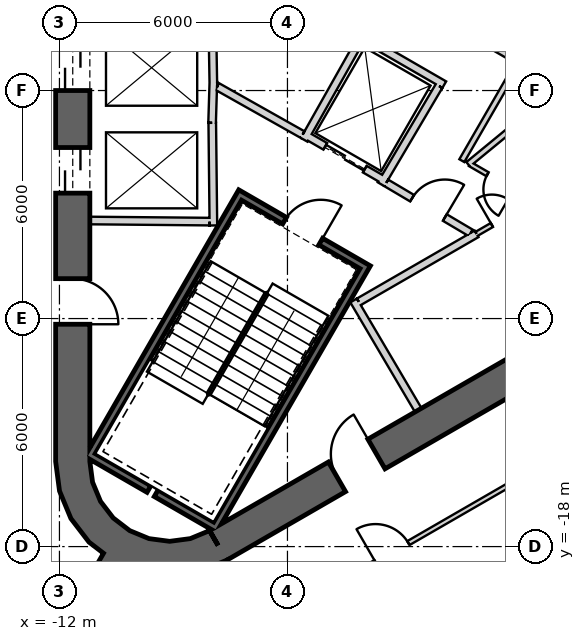
"""IFC4 building model, lengths in metres.
Left out: names, types, materials, properties, quantities, classifications, styles, units other than length and angle.
Written with IfcOpenShell. Run it as: python <this file> out.ifc"""

import sys

from ifc_helpers import new_model, si_unit, direction, frame, frame_2d, origin, place, context, subcontext, project, spatial, polyline, rectangle, outline, extrude, element, fill, save


model = new_model("IFC4")
c1 = context("Model", 3, precision=1e-05, world=origin(), true_north=direction((0.0, 1.0)))
c2 = subcontext(c1, "Body", "Model", "MODEL_VIEW")
j1 = project(units=[si_unit("LENGTHUNIT", "METRE"), si_unit("PLANEANGLEUNIT", "RADIAN")], contexts=[c1])
p1 = place(None, origin())
s1 = spatial("IfcSite", under=j1, at=p1, CompositionType="ELEMENT")
p2 = place(p1, origin())
s2 = spatial("IfcBuilding", under=s1, at=p2, CompositionType="ELEMENT")
p3 = place(p2, frame((0.0, 0.0, 368.9)))
s3 = spatial("IfcBuildingStorey", under=s2, at=p3, CompositionType="ELEMENT", Elevation=368.9)
p4 = place(p3, frame((-11.65, 15.762, 0.0), z_axis=(0.0, 0.0, 1.0), x_axis=(0.0, -1.0, 0.0)))
e1 = element("IfcWall", 1, at=p4, inside=s3, PredefinedType="SHEAR", context=c2, shape_type="SweptSolid", body=[
    extrude(rectangle(XDim=31.523, YDim=0.9, at=frame_2d((15.762, 0.0))), origin(), (0.0, 0.0, 1.0), 3.9),
])
p5 = place(p4, frame((7.062, 0.0, 0.0)))
e2 = element("IfcOpeningElement", 2, at=p5, cuts=e1, PredefinedType="OPENING", context=c2, shape_type="SweptSolid", body=[
    extrude(rectangle(XDim=1.2, YDim=2.4, at=frame_2d((0.6, 1.2))), frame((0.0, 0.46, 0.0), z_axis=(0.0, -1.0, 0.0), x_axis=(1.0, 0.0, 0.0)), (0.0, 0.0, 1.0), 0.92),
])
p6 = place(p4, frame((9.762, 0.0, 0.0)))
e3 = element("IfcOpeningElement", 3, at=p6, cuts=e1, PredefinedType="OPENING", context=c2, shape_type="SweptSolid", body=[
    extrude(rectangle(XDim=1.2, YDim=2.4, at=frame_2d((0.6, 1.2))), frame((0.0, 0.46, 0.0), z_axis=(0.0, -1.0, 0.0), x_axis=(1.0, 0.0, 0.0)), (0.0, 0.0, 1.0), 0.92),
])
p7 = place(p4, frame((12.462, 0.0, 0.0)))
e4 = element("IfcOpeningElement", 4, at=p7, cuts=e1, PredefinedType="OPENING", context=c2, shape_type="SweptSolid", body=[
    extrude(rectangle(XDim=1.2, YDim=2.4, at=frame_2d((0.6, 1.2))), frame((0.0, 0.46, 0.0), z_axis=(0.0, -1.0, 0.0), x_axis=(1.0, 0.0, 0.0)), (0.0, 0.0, 1.0), 0.92),
])
p8 = place(p4, frame((15.162, 0.0, 0.0)))
e5 = element("IfcOpeningElement", 5, at=p8, cuts=e1, PredefinedType="OPENING", context=c2, shape_type="SweptSolid", body=[
    extrude(rectangle(XDim=1.2, YDim=2.4, at=frame_2d((0.6, 1.2))), frame((0.0, 0.46, 0.0), z_axis=(0.0, -1.0, 0.0), x_axis=(1.0, 0.0, 0.0)), (0.0, 0.0, 1.0), 0.92),
])
p9 = place(p4, frame((17.862, 0.0, 0.0)))
e6 = element("IfcOpeningElement", 6, at=p9, cuts=e1, PredefinedType="OPENING", context=c2, shape_type="SweptSolid", body=[
    extrude(rectangle(XDim=1.2, YDim=2.4, at=frame_2d((0.6, 1.2))), frame((0.0, 0.46, 0.0), z_axis=(0.0, -1.0, 0.0), x_axis=(1.0, 0.0, 0.0)), (0.0, 0.0, 1.0), 0.92),
])
p10 = place(p4, frame((20.562, 0.0, 0.0)))
e7 = element("IfcOpeningElement", 7, at=p10, cuts=e1, PredefinedType="OPENING", context=c2, shape_type="SweptSolid", body=[
    extrude(rectangle(XDim=1.2, YDim=2.4, at=frame_2d((0.6, 1.2))), frame((0.0, 0.46, 0.0), z_axis=(0.0, -1.0, 0.0), x_axis=(1.0, 0.0, 0.0)), (0.0, 0.0, 1.0), 0.92),
])
p11 = place(p4, frame((23.262, 0.0, 0.0)))
e8 = element("IfcOpeningElement", 8, at=p11, cuts=e1, PredefinedType="OPENING", context=c2, shape_type="SweptSolid", body=[
    extrude(rectangle(XDim=1.2, YDim=2.4, at=frame_2d((0.6, 1.2))), frame((0.0, 0.46, 0.0), z_axis=(0.0, -1.0, 0.0), x_axis=(1.0, 0.0, 0.0)), (0.0, 0.0, 1.0), 0.92),
])
p12 = place(p4, frame((3.612, 0.0, 0.0)))
e9 = element("IfcOpeningElement", 9, at=p12, cuts=e1, PredefinedType="OPENING", context=c2, shape_type="SweptSolid", body=[
    extrude(rectangle(XDim=1.2, YDim=2.4, at=frame_2d((0.6, 1.2))), frame((0.0, 0.46, 0.0), z_axis=(0.0, -1.0, 0.0), x_axis=(1.0, 0.0, 0.0)), (0.0, 0.0, 1.0), 0.92),
])
p13 = place(p4, frame((26.712, 0.0, 0.0)))
e10 = element("IfcOpeningElement", 10, at=p13, cuts=e1, PredefinedType="OPENING", context=c2, shape_type="SweptSolid", body=[
    extrude(rectangle(XDim=1.2, YDim=2.4, at=frame_2d((0.6, 1.2))), frame((0.0, 0.46, 0.0), z_axis=(0.0, -1.0, 0.0), x_axis=(1.0, 0.0, 0.0)), (0.0, 0.0, 1.0), 0.92),
])
p14 = place(p3, frame((-7.825, -17.97, 0.0), z_axis=(0.0, 0.0, 1.0), x_axis=(0.866028369851, 0.499994862586, 0.0)))
e11 = element("IfcWall", 11, at=p14, inside=s3, PredefinedType="SHEAR", context=c2, shape_type="SweptSolid", body=[
    extrude(rectangle(XDim=31.523, YDim=0.9, at=frame_2d((15.762, 0.0))), origin(), (0.0, 0.0, 1.0), 3.9),
])
p15 = place(p14, frame((17.862, 0.0, 0.0)))
e12 = element("IfcOpeningElement", 12, at=p15, cuts=e11, PredefinedType="OPENING", context=c2, shape_type="SweptSolid", body=[
    extrude(rectangle(XDim=1.2, YDim=2.4, at=frame_2d((0.6, 1.2))), frame((0.0, 0.46, 0.0), z_axis=(0.0, -1.0, 0.0), x_axis=(1.0, 0.0, 0.0)), (0.0, 0.0, 1.0), 0.92),
])
p16 = place(p14, frame((20.562, 0.0, 0.0)))
e13 = element("IfcOpeningElement", 13, at=p16, cuts=e11, PredefinedType="OPENING", context=c2, shape_type="SweptSolid", body=[
    extrude(rectangle(XDim=1.2, YDim=2.4, at=frame_2d((0.6, 1.2))), frame((0.0, 0.46, 0.0), z_axis=(0.0, -1.0, 0.0), x_axis=(1.0, 0.0, 0.0)), (0.0, 0.0, 1.0), 0.92),
])
p17 = place(p14, frame((26.712, 0.0, 0.0)))
e14 = element("IfcOpeningElement", 14, at=p17, cuts=e11, PredefinedType="OPENING", context=c2, shape_type="SweptSolid", body=[
    extrude(rectangle(XDim=1.2, YDim=2.4, at=frame_2d((0.6, 1.2))), frame((0.0, 0.46, 0.0), z_axis=(0.0, -1.0, 0.0), x_axis=(1.0, 0.0, 0.0)), (0.0, 0.0, 1.0), 0.92),
])
p18 = place(p14, frame((3.612, 0.0, 0.0)))
e15 = element("IfcOpeningElement", 15, at=p18, cuts=e11, PredefinedType="OPENING", context=c2, shape_type="SweptSolid", body=[
    extrude(rectangle(XDim=1.2, YDim=2.4, at=frame_2d((0.6, 1.2))), frame((0.0, 0.46, 0.0), z_axis=(0.0, -1.0, 0.0), x_axis=(1.0, 0.0, 0.0)), (0.0, 0.0, 1.0), 0.92),
])
p19 = place(p3, origin())
e16 = element("IfcWall", 16, at=p19, inside=s3, PredefinedType="SHEAR", context=c2, shape_type="SweptSolid", body=[
    extrude(outline(polyline([(-12.1, -15.762), (-11.998, -16.538), (-11.698, -17.262), (-11.221, -17.883), (-10.6, -18.36), (-9.876, -18.659), (-9.1, -18.762), (-8.323, -18.659), (-7.6, -18.36), (-8.05, -17.58), (-8.556, -17.79), (-9.1, -17.862), (-9.644, -17.79), (-10.15, -17.58), (-10.585, -17.247), (-10.919, -16.812), (-11.128, -16.305), (-11.2, -15.762), (-12.1, -15.762)])), origin(), (0.0, 0.0, 1.0), 3.9),
])
p20 = place(p3, frame((-10.575, -18.316, 0.0), z_axis=(0.0, 0.0, 1.0), x_axis=(-0.499997253739, -0.866026989333, 0.0)))
e17 = element("IfcWall", 17, at=p20, inside=s3, PredefinedType="SHEAR", context=c2, shape_type="SweptSolid", body=[
    extrude(rectangle(XDim=6.921, YDim=0.6, at=frame_2d((3.461, 0.0))), origin(), (0.0, 0.0, 1.0), 3.9),
])
p21 = place(p20, frame((2.95, 0.0, 0.0)))
e18 = element("IfcOpeningElement", 18, at=p21, cuts=e17, PredefinedType="OPENING", context=c2, shape_type="SweptSolid", body=[
    extrude(rectangle(XDim=1.4, YDim=2.4, at=frame_2d((0.7, 1.2))), frame((0.0, 0.31, 0.0), z_axis=(0.0, -1.0, 0.0), x_axis=(1.0, 0.0, 0.0)), (0.0, 0.0, 1.0), 0.62),
])
p22 = place(p3, frame((-7.95, -5.772, 0.0), z_axis=(0.0, 0.0, 1.0), x_axis=(-0.030803413295, -0.999525462272, 0.0)))
e19 = element("IfcWall", 19, at=p22, inside=s3, PredefinedType="PLUMBINGWALL", context=c2, shape_type="SweptSolid", body=[
    extrude(rectangle(XDim=1.078, YDim=0.2, at=frame_2d((0.539, 0.0))), origin(), (0.0, 0.0, 1.0), 3.6),
])
p23 = place(p3, frame((-7.971, -4.05, 0.0), z_axis=(0.0, 0.0, 1.0), x_axis=(0.012042535896, -0.999927486035, 0.0)))
e20 = element("IfcWall", 20, at=p23, inside=s3, PredefinedType="PLUMBINGWALL", context=c2, shape_type="SweptSolid", body=[
    extrude(rectangle(XDim=1.845, YDim=0.2, at=frame_2d((0.922, 0.0))), origin(), (0.0, 0.0, 1.0), 3.6),
])
p24 = place(p3, frame((-7.979, -6.85, 0.0), z_axis=(0.0, 0.0, 1.0), x_axis=(0.011121475088, -0.999938154483, 0.0)))
e21 = element("IfcWall", 21, at=p24, inside=s3, PredefinedType="PLUMBINGWALL", context=c2, shape_type="SweptSolid", body=[
    extrude(rectangle(XDim=2.7, YDim=0.2, at=frame_2d((1.35, 0.0))), origin(), (0.0, 0.0, 1.0), 3.6),
])
p25 = place(p3, frame((-8.05, -9.449, 0.0), z_axis=(0.0, 0.0, 1.0), x_axis=(-0.999957467379, 0.009222983926, 0.0)))
e22 = element("IfcWall", 22, at=p25, inside=s3, PredefinedType="PLUMBINGWALL", context=c2, shape_type="SweptSolid", body=[
    extrude(rectangle(XDim=3.15, YDim=0.2, at=frame_2d((1.575, 0.0))), origin(), (0.0, 0.0, 1.0), 3.6),
])
p26 = place(p3, frame((-3.905, -10.563, -0.3), z_axis=(0.0, 0.0, 1.0), x_axis=(-0.500012932018, -0.866017937352, 0.0)))
e23 = element("IfcWall", 23, at=p26, inside=s3, PredefinedType="SHEAR", context=c2, shape_type="SweptSolid", body=[
    extrude(rectangle(XDim=8.1, YDim=0.2, at=frame_2d((4.05, 0.0))), origin(), (0.0, 0.0, 1.0), 3.9),
])
p27 = place(p3, frame((-11.282, -15.541, -0.3), z_axis=(0.0, 0.0, 1.0), x_axis=(0.866000578957, -0.500042995397, 0.0)))
e24 = element("IfcWall", 24, at=p27, inside=s3, PredefinedType="SHEAR", context=c2, shape_type="SweptSolid", body=[
    extrude(rectangle(XDim=1.89, YDim=0.2, at=frame_2d((0.945, 0.0))), origin(), (0.0, 0.0, 1.0), 3.9),
])
p28 = place(p3, frame((-9.455, -16.596, -0.3), z_axis=(0.0, 0.0, 1.0), x_axis=(0.866038843867, -0.499976720371, 0.0)))
e25 = element("IfcWall", 25, at=p28, inside=s3, PredefinedType="SHEAR", context=c2, shape_type="SweptSolid", body=[
    extrude(rectangle(XDim=1.69, YDim=0.2, at=frame_2d((0.845, 0.0))), origin(), (0.0, 0.0, 1.0), 3.9),
])
p29 = place(p3, frame((-7.196, -8.663, -0.3), z_axis=(0.0, 0.0, 1.0), x_axis=(-0.499997992926, -0.866026562566, 0.0)))
e26 = element("IfcWall", 26, at=p29, inside=s3, PredefinedType="SHEAR", context=c2, shape_type="SweptSolid", body=[
    extrude(rectangle(XDim=7.9, YDim=0.2, at=frame_2d((3.95, 0.0))), origin(), (0.0, 0.0, 1.0), 3.9),
])
p30 = place(p3, frame((-4.041, -10.599, -0.3), z_axis=(0.0, 0.0, 1.0), x_axis=(-0.866047807691, 0.499961193289, 0.0)))
e27 = element("IfcWall", 27, at=p30, inside=s3, PredefinedType="SHEAR", context=c2, shape_type="SweptSolid", body=[
    extrude(rectangle(XDim=3.6, YDim=0.2, at=frame_2d((1.8, 0.0))), origin(), (0.0, 0.0, 1.0), 3.9),
])
p31 = place(p30, frame((1.25, 0.0, 0.3)))
e28 = element("IfcOpeningElement", 28, at=p31, cuts=e27, PredefinedType="OPENING", context=c2, shape_type="SweptSolid", body=[
    extrude(rectangle(XDim=1.1, YDim=2.1, at=frame_2d((0.55, 1.05))), frame((0.0, 0.11, 0.0), z_axis=(0.0, -1.0, 0.0), x_axis=(1.0, 0.0, 0.0)), (0.0, 0.0, 1.0), 0.22),
])
p32 = place(p3, frame((-3.446, -8.368, 0.0), z_axis=(0.0, 0.0, 1.0), x_axis=(-0.866024647952, 0.500001309137, 0.0)))
e29 = element("IfcWall", 29, at=p32, inside=s3, PredefinedType="PLUMBINGWALL", context=c2, shape_type="SweptSolid", body=[
    extrude(rectangle(XDim=2.4, YDim=0.2, at=frame_2d((1.2, 0.0))), origin(), (0.0, 0.0, 1.0), 3.6),
])
p33 = place(p32, frame((0.6, 0.0, 0.0)))
e30 = element("IfcOpeningElement", 30, at=p33, cuts=e29, PredefinedType="OPENING", context=c2, shape_type="SweptSolid", body=[
    extrude(rectangle(XDim=1.2, YDim=2.4, at=frame_2d((0.6, 1.2))), frame((0.0, 0.11, 0.0), z_axis=(0.0, -1.0, 0.0), x_axis=(1.0, 0.0, 0.0)), (0.0, 0.0, 1.0), 0.22),
])
p34 = place(p3, frame((-1.961, -5.796, 0.0), z_axis=(0.0, 0.0, 1.0), x_axis=(-0.508647062354, -0.860975125052, 0.0)))
e31 = element("IfcWall", 31, at=p34, inside=s3, PredefinedType="PLUMBINGWALL", context=c2, shape_type="SweptSolid", body=[
    extrude(rectangle(XDim=3.1, YDim=0.2, at=frame_2d((1.55, 0.0))), origin(), (0.0, 0.0, 1.0), 3.6),
])
p35 = place(p3, frame((-3.99, -4.509, 0.0), z_axis=(0.0, 0.0, 1.0), x_axis=(-0.491358283181, -0.870957540612, 0.0)))
e32 = element("IfcWall", 32, at=p35, inside=s3, PredefinedType="PLUMBINGWALL", context=c2, shape_type="SweptSolid", body=[
    extrude(rectangle(XDim=3.2, YDim=0.2, at=frame_2d((1.6, 0.0))), origin(), (0.0, 0.0, 1.0), 3.6),
])
p36 = place(p3, frame((-3.953, -4.646, 0.0), z_axis=(0.0, 0.0, 1.0), x_axis=(0.866065302921, -0.4999308863, 0.0)))
e33 = element("IfcWall", 33, at=p36, inside=s3, PredefinedType="PLUMBINGWALL", context=c2, shape_type="SweptSolid", body=[
    extrude(rectangle(XDim=2.264, YDim=0.2, at=frame_2d((1.132, 0.0))), origin(), (0.0, 0.0, 1.0), 3.6),
])
p37 = place(p3, frame((-4.26, -11.524, 0.0), z_axis=(0.0, 0.0, 1.0), x_axis=(0.507997497166, -0.861358544901, 0.0)))
e34 = element("IfcWall", 34, at=p37, inside=s3, PredefinedType="PARTITIONING", context=c2, shape_type="SweptSolid", body=[
    extrude(rectangle(XDim=3.35, YDim=0.2, at=frame_2d((1.675, 0.0))), origin(), (0.0, 0.0, 1.0), 3.6),
])
p38 = place(p3, frame((-1.024, -9.771, 0.0), z_axis=(0.0, 0.0, 1.0), x_axis=(-0.866029903013, -0.499992207027, 0.0)))
e35 = element("IfcWall", 35, at=p38, inside=s3, PredefinedType="PARTITIONING", context=c2, shape_type="SweptSolid", body=[
    extrude(rectangle(XDim=3.578, YDim=0.2, at=frame_2d((1.789, 0.0))), origin(), (0.0, 0.0, 1.0), 3.6),
])
p39 = place(p38, frame((1.389, 0.0, 0.0)))
e36 = element("IfcOpeningElement", 36, at=p39, cuts=e35, PredefinedType="OPENING", context=c2, shape_type="SweptSolid", body=[
    extrude(rectangle(XDim=0.8, YDim=2.1, at=frame_2d((0.4, 1.05))), frame((0.0, 0.11, 0.0), z_axis=(0.0, -1.0, 0.0), x_axis=(1.0, 0.0, 0.0)), (0.0, 0.0, 1.0), 0.22),
])
p40 = place(p3, frame((-1.023, -9.772, 0.0), z_axis=(0.0, 0.0, 1.0), x_axis=(0.874290944206, 0.485402250592, 0.0)))
e37 = element("IfcWall", 37, at=p40, inside=s3, PredefinedType="PARTITIONING", context=c2, shape_type="SweptSolid", body=[
    extrude(rectangle(XDim=1.723, YDim=0.12, at=frame_2d((0.861, 0.0))), origin(), (0.0, 0.0, 1.0), 3.6),
])
p41 = place(p3, frame((-3.401, -8.43, 0.0), z_axis=(0.0, 0.0, 1.0), x_axis=(0.860630814782, -0.509229418482, 0.0)))
e38 = element("IfcWall", 38, at=p41, inside=s3, PredefinedType="PARTITIONING", context=c2, shape_type="SweptSolid", body=[
    extrude(rectangle(XDim=2.582, YDim=0.2, at=frame_2d((1.291, 0.0))), origin(), (0.0, 0.0, 1.0), 3.6),
])
p42 = place(p3, frame((-7.849, -5.894, 0.0), z_axis=(0.0, 0.0, 1.0), x_axis=(0.871363259478, -0.490638431059, 0.0)))
e39 = element("IfcWall", 39, at=p42, inside=s3, PredefinedType="PARTITIONING", context=c2, shape_type="SweptSolid", body=[
    extrude(rectangle(XDim=2.581, YDim=0.2, at=frame_2d((1.291, 0.0))), origin(), (0.0, 0.0, 1.0), 3.6),
])
p43 = place(p42, frame((0.791, 0.0, 0.0)))
e40 = element("IfcOpeningElement", 40, at=p43, cuts=e39, PredefinedType="OPENING", context=c2, shape_type="SweptSolid", body=[
    extrude(rectangle(XDim=1.0, YDim=2.1, at=frame_2d((0.5, 1.05))), frame((0.0, 0.11, 0.0), z_axis=(0.0, -1.0, 0.0), x_axis=(1.0, 0.0, 0.0)), (0.0, 0.0, 1.0), 0.22),
])
p44 = place(p3, frame((0.224, -1.761, 0.0), z_axis=(0.0, 0.0, 1.0), x_axis=(-0.494327216836, -0.869275907118, 0.0)))
e41 = element("IfcWall", 41, at=p44, inside=s3, PredefinedType="PARTITIONING", context=c2, shape_type="SweptSolid", body=[
    extrude(rectangle(XDim=4.487, YDim=0.12, at=frame_2d((2.244, 0.0))), origin(), (0.0, 0.0, 1.0), 3.6),
])
p45 = place(p44, frame((1.895, 0.0, 0.0)))
e42 = element("IfcOpeningElement", 42, at=p45, cuts=e41, PredefinedType="OPENING", context=c2, shape_type="SweptSolid", body=[
    extrude(rectangle(XDim=0.8, YDim=2.1, at=frame_2d((0.4, 1.05))), frame((0.0, 0.07, 0.0), z_axis=(0.0, -1.0, 0.0), x_axis=(1.0, 0.0, 0.0)), (0.0, 0.0, 1.0), 0.14),
])
p46 = place(p3, frame((-6.126, -5.21, 0.0), z_axis=(0.0, 0.0, 1.0), x_axis=(0.499990139034, 0.866031096941, 0.0)))
e43 = element("IfcWall", 43, at=p46, inside=s3, PredefinedType="PLUMBINGWALL", context=c2, shape_type="SweptSolid", body=[
    extrude(rectangle(XDim=3.0, YDim=0.15, at=frame_2d((1.5, 0.0))), origin(), (0.0, 0.0, 1.0), 3.6),
])
p47 = place(p3, frame((-7.95, -4.041, 0.0), z_axis=(0.0, 0.0, 1.0), x_axis=(0.860090281069, -0.510141851263, 0.0)))
e44 = element("IfcWall", 44, at=p47, inside=s3, PredefinedType="PLUMBINGWALL", context=c2, shape_type="SweptSolid", body=[
    extrude(rectangle(XDim=2.089, YDim=0.15, at=frame_2d((1.045, 0.0))), origin(), (0.0, 0.0, 1.0), 3.6),
])
p48 = place(p3, frame((-6.852, -20.93, 0.0), z_axis=(0.0, 0.0, 1.0), x_axis=(0.866025322732, 0.500000140387, 0.0)))
e45 = element("IfcWall", 45, at=p48, inside=s3, PredefinedType="PARTITIONING", context=c2, shape_type="SweptSolid", body=[
    extrude(rectangle(XDim=22.857, YDim=0.2, at=frame_2d((11.428, 0.0))), origin(), (0.0, 0.0, 1.0), 2.97),
])
p49 = place(p48, frame((10.9, 0.0, 0.0)))
e46 = element("IfcOpeningElement", 46, at=p49, cuts=e45, PredefinedType="OPENING", context=c2, shape_type="SweptSolid", body=[
    extrude(rectangle(XDim=1.0, YDim=2.1, at=frame_2d((0.5, 1.05))), frame((0.0, 0.11, 0.0), z_axis=(0.0, -1.0, 0.0), x_axis=(1.0, 0.0, 0.0)), (0.0, 0.0, 1.0), 0.22),
])
p50 = place(p31, origin())
e47 = element("IfcDoor", 47, at=p50, inside=s3, OperationType="SINGLE_SWING_LEFT", PredefinedType="USERDEFINED", context=c2, shape_type="SweptSolid", body=[
    extrude(rectangle(XDim=1.1, YDim=2.1, at=frame_2d((0.55, 1.05))), frame((0.0, 0.025, 0.0), z_axis=(0.0, -1.0, 0.0), x_axis=(1.0, 0.0, 0.0)), (0.0, 0.0, 1.0), 0.05),
])
fill(e28, e47)
p51 = place(p43, origin())
e48 = element("IfcDoor", 48, at=p51, inside=s3, OperationType="SINGLE_SWING_RIGHT", PredefinedType="USERDEFINED", context=c2, shape_type="SweptSolid", body=[
    extrude(rectangle(XDim=1.0, YDim=2.1, at=frame_2d((0.5, 1.05))), frame((0.0, 0.025, 0.0), z_axis=(0.0, -1.0, 0.0), x_axis=(1.0, 0.0, 0.0)), (0.0, 0.0, 1.0), 0.05),
])
fill(e40, e48)
p52 = place(p33, origin())
e49 = element("IfcDoor", 49, at=p52, inside=s3, OperationType="SLIDING_TO_LEFT", PredefinedType="USERDEFINED", context=c2, shape_type="SweptSolid", body=[
    extrude(rectangle(XDim=1.2, YDim=2.4, at=frame_2d((0.6, 1.2))), frame((0.0, 0.025, 0.0), z_axis=(0.0, -1.0, 0.0), x_axis=(1.0, 0.0, 0.0)), (0.0, 0.0, 1.0), 0.05),
])
fill(e30, e49)
p53 = place(p39, origin())
e50 = element("IfcDoor", 50, at=p53, inside=s3, OperationType="SINGLE_SWING_LEFT", PredefinedType="USERDEFINED", context=c2, shape_type="SweptSolid", body=[
    extrude(rectangle(XDim=0.8, YDim=2.1, at=frame_2d((0.4, 1.05))), frame((0.0, 0.025, 0.0), z_axis=(0.0, -1.0, 0.0), x_axis=(1.0, 0.0, 0.0)), (0.0, 0.0, 1.0), 0.05),
])
fill(e36, e50)
p54 = place(p10, origin())
e51 = element("IfcDoor", 51, at=p54, inside=s3, OperationType="SLIDING_TO_LEFT", PredefinedType="USERDEFINED", context=c2, shape_type="SweptSolid", body=[
    extrude(rectangle(XDim=1.2, YDim=2.4, at=frame_2d((0.6, 1.2))), frame((0.0, 0.025, 0.0), z_axis=(0.0, -1.0, 0.0), x_axis=(1.0, 0.0, 0.0)), (0.0, 0.0, 1.0), 0.05),
])
fill(e7, e51)
p55 = place(p11, origin())
e52 = element("IfcDoor", 52, at=p55, inside=s3, OperationType="SLIDING_TO_LEFT", PredefinedType="USERDEFINED", context=c2, shape_type="SweptSolid", body=[
    extrude(rectangle(XDim=1.2, YDim=2.4, at=frame_2d((0.6, 1.2))), frame((0.0, 0.025, 0.0), z_axis=(0.0, -1.0, 0.0), x_axis=(1.0, 0.0, 0.0)), (0.0, 0.0, 1.0), 0.05),
])
fill(e8, e52)
p56 = place(p13, origin())
e53 = element("IfcDoor", 53, at=p56, inside=s3, OperationType="SINGLE_SWING_LEFT", PredefinedType="USERDEFINED", context=c2, shape_type="SweptSolid", body=[
    extrude(rectangle(XDim=1.2, YDim=2.4, at=frame_2d((0.6, 1.2))), frame((0.0, 0.025, 0.0), z_axis=(0.0, -1.0, 0.0), x_axis=(1.0, 0.0, 0.0)), (0.0, 0.0, 1.0), 0.05),
])
fill(e10, e53)
p57 = place(p18, origin())
e54 = element("IfcDoor", 54, at=p57, inside=s3, OperationType="SINGLE_SWING_RIGHT", PredefinedType="USERDEFINED", context=c2, shape_type="SweptSolid", body=[
    extrude(rectangle(XDim=1.2, YDim=2.4, at=frame_2d((0.6, 1.2))), frame((0.0, 0.025, 0.0), z_axis=(0.0, -1.0, 0.0), x_axis=(1.0, 0.0, 0.0)), (0.0, 0.0, 1.0), 0.05),
])
fill(e15, e54)
save(model, sys.argv[1])
